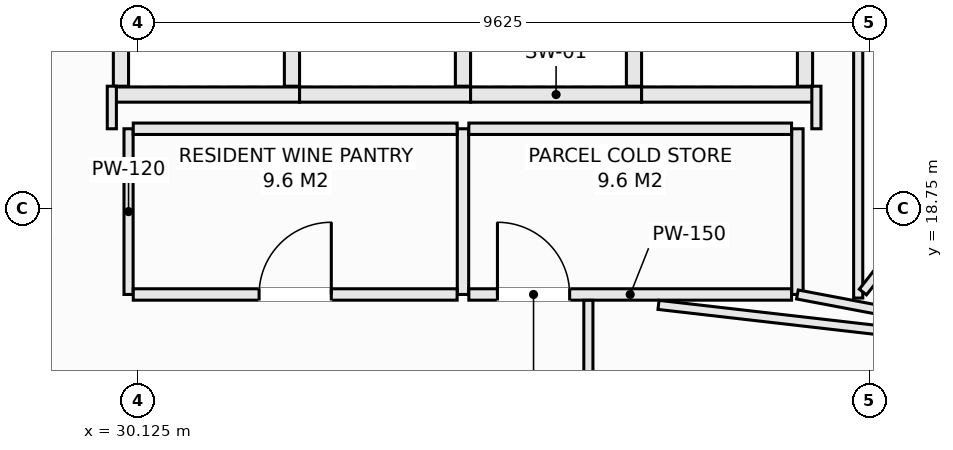
"""IFC4 building model, lengths in metres.
Left out: names, types, materials, properties, quantities, classifications, styles, units other than length and angle.
Written with IfcOpenShell. Run it as: python <this file> out.ifc"""

import sys

from ifc_helpers import new_model, si_unit, direction, frame, frame_2d, origin, place, context, subcontext, project, spatial, rectangle, extrude, element, fill, save


model = new_model("IFC4")
c1 = context("Model", 3, precision=1e-05, world=origin(), true_north=direction((0.0, 1.0)))
c2 = subcontext(c1, "Body", "Model", "MODEL_VIEW")
j1 = project(units=[si_unit("LENGTHUNIT", "METRE"), si_unit("PLANEANGLEUNIT", "RADIAN")], contexts=[c1])
p1 = place(None, origin())
s1 = spatial("IfcSite", under=j1, at=p1, CompositionType="ELEMENT")
p2 = place(p1, origin())
s2 = spatial("IfcBuilding", under=s1, at=p2, CompositionType="ELEMENT")
p3 = place(p2, frame((0.0, 0.0, 262.4)))
s3 = spatial("IfcBuildingStorey", under=s2, at=p3, CompositionType="ELEMENT", Elevation=262.4)
p4 = place(p3, frame((29.8, 20.25, 0.0), z_axis=(0.0, 0.0, 1.0), x_axis=(1.0, 0.0, 0.0)))
e1 = element("IfcWall", 1, at=p4, inside=s3, PredefinedType="SOLIDWALL", context=c2, shape_type="SweptSolid", body=[
    extrude(rectangle(XDim=2.45, YDim=0.2, at=frame_2d((1.225, 0.0))), origin(), (0.0, 0.0, 1.0), 3.03),
])
for number, where, z_axis, x_axis in (
    (2, (29.9, 20.36, 0.0), (0.0, 0.0, 1.0), (0.0, 1.0, 0.0)),
    (3, (32.15, 20.36, 0.0), (0.0, 0.0, 1.0), (0.0, 1.0, 0.0)),
):
    element("IfcWall", number, at=place(p3, frame(where, z_axis=z_axis, x_axis=x_axis)), inside=s3, PredefinedType="SOLIDWALL", context=c2, shape_type="SweptSolid", body=[
        extrude(rectangle(XDim=2.43, YDim=0.2, at=frame_2d((1.215, 0.0))), origin(), (0.0, 0.0, 1.0), 3.03),
    ])
p5 = place(p3, frame((32.25, 20.25, 0.0), z_axis=(0.0, 0.0, 1.0), x_axis=(1.0, 0.0, 0.0)))
e4 = element("IfcWall", 4, at=p5, inside=s3, PredefinedType="SOLIDWALL", context=c2, shape_type="SweptSolid", body=[
    extrude(rectangle(XDim=2.25, YDim=0.2, at=frame_2d((1.125, 0.0))), origin(), (0.0, 0.0, 1.0), 3.03),
])
p6 = place(p3, frame((34.4, 20.36, 0.0), z_axis=(0.0, 0.0, 1.0), x_axis=(0.0, 1.0, 0.0)))
e5 = element("IfcWall", 5, at=p6, inside=s3, PredefinedType="SOLIDWALL", context=c2, shape_type="SweptSolid", body=[
    extrude(rectangle(XDim=2.43, YDim=0.2, at=frame_2d((1.215, 0.0))), origin(), (0.0, 0.0, 1.0), 3.03),
])
p7 = place(p3, frame((34.5, 20.25, 0.0), z_axis=(0.0, 0.0, 1.0), x_axis=(1.0, 0.0, 0.0)))
e6 = element("IfcWall", 6, at=p7, inside=s3, PredefinedType="SOLIDWALL", context=c2, shape_type="SweptSolid", body=[
    extrude(rectangle(XDim=2.25, YDim=0.2, at=frame_2d((1.125, 0.0))), origin(), (0.0, 0.0, 1.0), 3.03),
])
p8 = place(p3, frame((36.65, 20.36, 0.0), z_axis=(0.0, 0.0, 1.0), x_axis=(0.0, 1.0, 0.0)))
e7 = element("IfcWall", 7, at=p8, inside=s3, PredefinedType="SOLIDWALL", context=c2, shape_type="SweptSolid", body=[
    extrude(rectangle(XDim=2.43, YDim=0.2, at=frame_2d((1.215, 0.0))), origin(), (0.0, 0.0, 1.0), 3.03),
])
p9 = place(p3, frame((36.75, 20.25, 0.0), z_axis=(0.0, 0.0, 1.0), x_axis=(1.0, 0.0, 0.0)))
e8 = element("IfcWall", 8, at=p9, inside=s3, PredefinedType="SOLIDWALL", context=c2, shape_type="SweptSolid", body=[
    extrude(rectangle(XDim=2.25, YDim=0.2, at=frame_2d((1.125, 0.0))), origin(), (0.0, 0.0, 1.0), 3.03),
])
p10 = place(p3, frame((38.9, 20.36, 0.0), z_axis=(0.0, 0.0, 1.0), x_axis=(0.0, 1.0, 0.0)))
e9 = element("IfcWall", 9, at=p10, inside=s3, PredefinedType="SOLIDWALL", context=c2, shape_type="SweptSolid", body=[
    extrude(rectangle(XDim=2.43, YDim=0.2, at=frame_2d((1.215, 0.0))), origin(), (0.0, 0.0, 1.0), 3.03),
])
p11 = place(p3, frame((30.0, 17.62, 0.0), z_axis=(0.0, 0.0, 1.0), x_axis=(0.0, 1.0, 0.0)))
e10 = element("IfcWall", 10, at=p11, inside=s3, PredefinedType="PARTITIONING", context=c2, shape_type="SweptSolid", body=[
    extrude(rectangle(XDim=2.18, YDim=0.12, at=frame_2d((1.09, 0.0))), origin(), (0.0, 0.0, 1.0), 3.03),
])
for number, where, z_axis, x_axis in (
    (11, (38.8, 17.62, 0.0), (0.0, 0.0, 1.0), (0.0, 1.0, 0.0)),
    (12, (34.4, 17.62, 0.0), (0.0, 0.0, 1.0), (0.0, 1.0, 0.0)),
):
    element("IfcWall", number, at=place(p3, frame(where, z_axis=z_axis, x_axis=x_axis)), inside=s3, PredefinedType="PARTITIONING", context=c2, shape_type="SweptSolid", body=[
        extrude(rectangle(XDim=2.18, YDim=0.15, at=frame_2d((1.09, 0.0))), origin(), (0.0, 0.0, 1.0), 3.03),
    ])
p12 = place(p3, frame((30.062, 17.62, 0.0), z_axis=(0.0, 0.0, 1.0), x_axis=(1.0, 0.0, 0.0)))
e13 = element("IfcWall", 13, at=p12, inside=s3, PredefinedType="PARTITIONING", context=c2, shape_type="SweptSolid", body=[
    extrude(rectangle(XDim=4.261, YDim=0.15, at=frame_2d((2.13, 0.0))), origin(), (0.0, 0.0, 1.0), 3.03),
])
p13 = place(p12, frame((1.656, 0.0, 0.0)))
e14 = element("IfcOpeningElement", 14, at=p13, cuts=e13, PredefinedType="OPENING", context=c2, shape_type="SweptSolid", body=[
    extrude(rectangle(XDim=0.95, YDim=2.1, at=frame_2d((0.475, 1.05))), frame((0.0, 0.085, 0.0), z_axis=(0.0, -1.0, 0.0), x_axis=(1.0, 0.0, 0.0)), (0.0, 0.0, 1.0), 0.17),
])
p14 = place(p3, frame((34.477, 17.62, 0.0), z_axis=(0.0, 0.0, 1.0), x_axis=(1.0, 0.0, 0.0)))
e15 = element("IfcWall", 15, at=p14, inside=s3, PredefinedType="PARTITIONING", context=c2, shape_type="SweptSolid", body=[
    extrude(rectangle(XDim=4.246, YDim=0.15, at=frame_2d((2.123, 0.0))), origin(), (0.0, 0.0, 1.0), 3.03),
])
p15 = place(p14, frame((0.376, 0.0, 0.0)))
e16 = element("IfcOpeningElement", 16, at=p15, cuts=e15, PredefinedType="OPENING", context=c2, shape_type="SweptSolid", body=[
    extrude(rectangle(XDim=0.95, YDim=2.1, at=frame_2d((0.475, 1.05))), frame((0.0, 0.085, 0.0), z_axis=(0.0, -1.0, 0.0), x_axis=(1.0, 0.0, 0.0)), (0.0, 0.0, 1.0), 0.17),
])
p16 = place(p3, frame((30.062, 19.8, 0.0), z_axis=(0.0, 0.0, 1.0), x_axis=(1.0, 0.0, 0.0)))
e17 = element("IfcWall", 17, at=p16, inside=s3, PredefinedType="PARTITIONING", context=c2, shape_type="SweptSolid", body=[
    extrude(rectangle(XDim=4.261, YDim=0.15, at=frame_2d((2.13, 0.0))), origin(), (0.0, 0.0, 1.0), 3.03),
])
p17 = place(p3, frame((34.477, 19.8, 0.0), z_axis=(0.0, 0.0, 1.0), x_axis=(1.0, 0.0, 0.0)))
e18 = element("IfcWall", 18, at=p17, inside=s3, PredefinedType="PARTITIONING", context=c2, shape_type="SweptSolid", body=[
    extrude(rectangle(XDim=4.246, YDim=0.15, at=frame_2d((2.123, 0.0))), origin(), (0.0, 0.0, 1.0), 3.03),
])
p18 = place(p3, frame((39.05, 19.8, 0.0), z_axis=(0.0, 0.0, 1.0), x_axis=(0.0, 1.0, 0.0)))
e19 = element("IfcWall", 19, at=p18, inside=s3, PredefinedType="PARTITIONING", context=c2, shape_type="SweptSolid", body=[
    extrude(rectangle(XDim=0.56, YDim=0.12, at=frame_2d((0.28, 0.0))), origin(), (0.0, 0.0, 1.0), 3.03),
])
p19 = place(p3, frame((39.6, 17.573, 0.0), z_axis=(0.0, 0.0, 1.0), x_axis=(0.0, 1.0, 0.0)))
e20 = element("IfcWall", 20, at=p19, inside=s3, PredefinedType="PARTITIONING", context=c2, shape_type="SweptSolid", body=[
    extrude(rectangle(XDim=5.447, YDim=0.12, at=frame_2d((2.724, 0.0))), origin(), (0.0, 0.0, 1.0), 2.478),
])
p20 = place(p3, frame((39.662, 17.652, 0.0), z_axis=(0.0, 0.0, 1.0), x_axis=(0.616212345115, 0.78758005671, 0.0)))
e21 = element("IfcWall", 21, at=p20, inside=s3, PredefinedType="PARTITIONING", context=c2, shape_type="SweptSolid", body=[
    extrude(rectangle(XDim=2.333, YDim=0.12, at=frame_2d((1.167, 0.0))), origin(), (0.0, 0.0, 1.0), 2.478),
])
p21 = place(p3, frame((29.78, 19.8, 0.0), z_axis=(0.0, 0.0, 1.0), x_axis=(0.0, 1.0, 0.0)))
e22 = element("IfcWall", 22, at=p21, inside=s3, PredefinedType="PARTITIONING", context=c2, shape_type="SweptSolid", body=[
    extrude(rectangle(XDim=0.56, YDim=0.12, at=frame_2d((0.28, 0.0))), origin(), (0.0, 0.0, 1.0), 3.03),
])
p22 = place(p3, frame((36.05, 14.95, 0.0), z_axis=(0.0, 0.0, 1.0), x_axis=(0.0, 1.0, 0.0)))
e23 = element("IfcWall", 23, at=p22, inside=s3, PredefinedType="PARTITIONING", context=c2, shape_type="SweptSolid", body=[
    extrude(rectangle(XDim=2.593, YDim=0.12, at=frame_2d((1.296, 0.0))), origin(), (0.0, 0.0, 1.0), 3.03),
])
p23 = place(p3, frame((36.972, 17.483, 0.0), z_axis=(0.0, 0.0, 1.0), x_axis=(0.993465006101, -0.114137117773, 0.0)))
e24 = element("IfcWall", 24, at=p23, inside=s3, PredefinedType="PARTITIONING", context=c2, shape_type="SweptSolid", body=[
    extrude(rectangle(XDim=6.413, YDim=0.12, at=frame_2d((3.207, 0.0))), origin(), (0.0, 0.0, 1.0), 2.77),
])
p24 = place(p3, frame((38.8, 17.62, 0.0), z_axis=(0.0, 0.0, 1.0), x_axis=(0.982513005499, -0.186193968823, 0.0)))
e25 = element("IfcWall", 25, at=p24, inside=s3, PredefinedType="PARTITIONING", context=c2, shape_type="SweptSolid", body=[
    extrude(rectangle(XDim=2.676, YDim=0.12, at=frame_2d((1.338, 0.0))), origin(), (0.0, 0.0, 1.0), 3.03),
])
p25 = place(p13, origin())
e26 = element("IfcDoor", 26, at=p25, inside=s3, OperationType="SINGLE_SWING_RIGHT", PredefinedType="DOOR", context=c2, shape_type="SweptSolid", body=[
    extrude(rectangle(XDim=0.95, YDim=2.1, at=frame_2d((0.475, 1.05))), frame((0.0, 0.025, 0.0), z_axis=(0.0, -1.0, 0.0), x_axis=(1.0, 0.0, 0.0)), (0.0, 0.0, 1.0), 0.05),
])
fill(e14, e26)
p26 = place(p15, origin())
e27 = element("IfcDoor", 27, at=p26, inside=s3, OperationType="SINGLE_SWING_LEFT", PredefinedType="DOOR", context=c2, shape_type="SweptSolid", body=[
    extrude(rectangle(XDim=0.95, YDim=2.1, at=frame_2d((0.475, 1.05))), frame((0.0, 0.025, 0.0), z_axis=(0.0, -1.0, 0.0), x_axis=(1.0, 0.0, 0.0)), (0.0, 0.0, 1.0), 0.05),
])
fill(e16, e27)
save(model, sys.argv[1])
